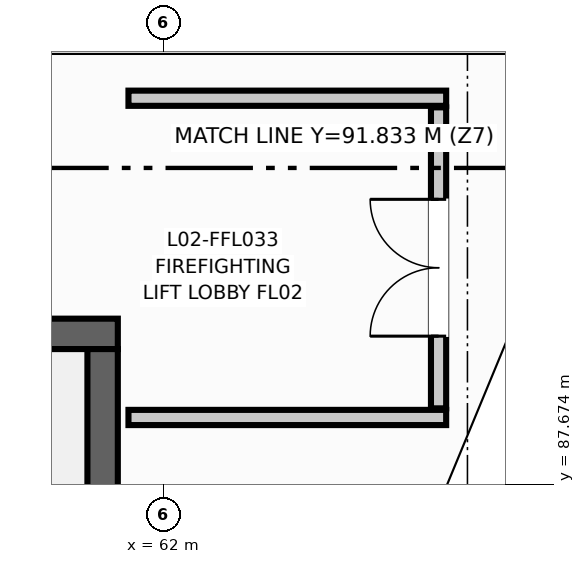
"""IFC4 building model, lengths in metres.
Left out: names, types, materials, properties, quantities, classifications, styles, units other than length and angle.
Written with IfcOpenShell. Run it as: python <this file> out.ifc"""

import sys

from ifc_helpers import new_model, si_unit, direction, frame, frame_2d, origin, place, context, subcontext, project, spatial, rectangle, extrude, element, fill, save


model = new_model("IFC4")
c1 = context("Model", 3, precision=1e-05, world=origin(), true_north=direction((0.0, 1.0)))
c2 = subcontext(c1, "Body", "Model", "MODEL_VIEW")
j1 = project(units=[si_unit("LENGTHUNIT", "METRE"), si_unit("PLANEANGLEUNIT", "RADIAN")], contexts=[c1])
p1 = place(None, origin())
s1 = spatial("IfcSite", under=j1, at=p1, CompositionType="ELEMENT")
p2 = place(p1, origin())
s2 = spatial("IfcBuilding", under=s1, at=p2, CompositionType="ELEMENT")
p3 = place(p2, frame((0.0, 0.0, 9.0)))
s3 = spatial("IfcBuildingStorey", under=s2, at=p3, CompositionType="ELEMENT", Elevation=9.0)
p4 = place(p3, frame((55.6, 89.65, 0.0), z_axis=(0.0, 0.0, 1.0), x_axis=(1.0, 0.0, 0.0)))
e1 = element("IfcWall", 1, at=p4, inside=s3, PredefinedType="SHEAR", context=c2, shape_type="SweptSolid", body=[
    extrude(rectangle(XDim=5.8, YDim=0.4, at=frame_2d((2.9, 0.0))), origin(), (0.0, 0.0, 1.0), 4.25),
])
p5 = place(p3, frame((61.2, 80.55, 0.0), z_axis=(0.0, 0.0, 1.0), x_axis=(0.0, 1.0, 0.0)))
e2 = element("IfcWall", 2, at=p5, inside=s3, PredefinedType="SHEAR", context=c2, shape_type="SweptSolid", body=[
    extrude(rectangle(XDim=8.9, YDim=0.4, at=frame_2d((4.45, 0.0))), origin(), (0.0, 0.0, 1.0), 4.25),
])
p6 = place(p5, frame((0.4, 0.0, 0.0)))
e3 = element("IfcOpeningElement", 3, at=p6, cuts=e2, PredefinedType="OPENING", context=c2, shape_type="SweptSolid", body=[
    extrude(rectangle(XDim=1.2, YDim=2.2, at=frame_2d((0.6, 1.1))), frame((0.0, 0.21, 0.0), z_axis=(0.0, -1.0, 0.0), x_axis=(1.0, 0.0, 0.0)), (0.0, 0.0, 1.0), 0.42),
])
for number, where, z_axis, x_axis in (
    (4, (61.54, 88.55, 0.0), (0.0, 0.0, 1.0), (1.0, 0.0, 0.0)),
    (5, (61.54, 92.75, 0.0), (0.0, 0.0, 1.0), (1.0, 0.0, 0.0)),
):
    element("IfcWall", number, at=place(p3, frame(where, z_axis=z_axis, x_axis=x_axis)), inside=s3, PredefinedType="PARTITIONING", context=c2, shape_type="SweptSolid", body=[
        extrude(rectangle(XDim=4.18, YDim=0.2, at=frame_2d((2.09, 0.0))), origin(), (0.0, 0.0, 1.0), 3.22),
    ])
p7 = place(p3, frame((65.62, 88.67, 0.0), z_axis=(0.0, 0.0, 1.0), x_axis=(0.0, 1.0, 0.0)))
e6 = element("IfcWall", 6, at=p7, inside=s3, PredefinedType="PARTITIONING", context=c2, shape_type="SweptSolid", body=[
    extrude(rectangle(XDim=3.96, YDim=0.2, at=frame_2d((1.98, 0.0))), origin(), (0.0, 0.0, 1.0), 3.22),
])
p8 = place(p7, frame((0.95, 0.0, 0.0)))
e7 = element("IfcOpeningElement", 7, at=p8, cuts=e6, PredefinedType="OPENING", context=c2, shape_type="SweptSolid", body=[
    extrude(rectangle(XDim=1.8, YDim=2.2, at=frame_2d((0.9, 1.1))), frame((0.0, 0.11, 0.0), z_axis=(0.0, -1.0, 0.0), x_axis=(1.0, 0.0, 0.0)), (0.0, 0.0, 1.0), 0.22),
])
p9 = place(p8, origin())
e8 = element("IfcDoor", 8, at=p9, inside=s3, OperationType="DOUBLE_DOOR_SINGLE_SWING", PredefinedType="DOOR", context=c2, shape_type="SweptSolid", body=[
    extrude(rectangle(XDim=1.8, YDim=2.2, at=frame_2d((0.9, 1.1))), frame((0.0, 0.025, 0.0), z_axis=(0.0, -1.0, 0.0), x_axis=(1.0, 0.0, 0.0)), (0.0, 0.0, 1.0), 0.05),
])
fill(e7, e8)
save(model, sys.argv[1])
